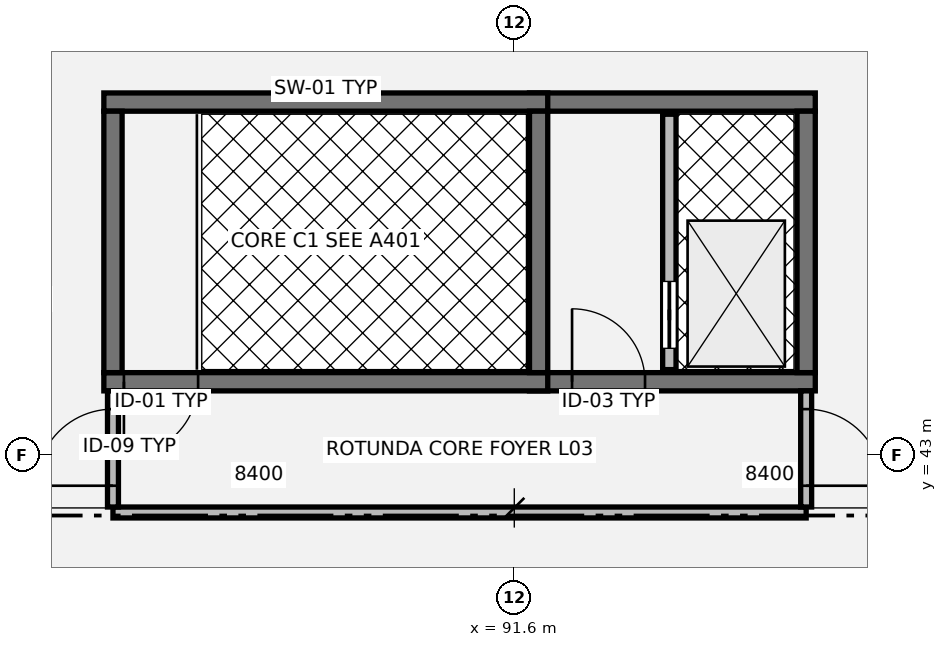
"""IFC4 building model, lengths in metres.
Left out: names, types, materials, properties, quantities, classifications, styles, units other than length and angle.
Written with IfcOpenShell. Run it as: python <this file> out.ifc"""

import sys

from ifc_helpers import new_model, si_unit, direction, frame, frame_2d, origin, place, context, subcontext, project, spatial, rectangle, circle, extrude, element, fill, save


model = new_model("IFC4")
c1 = context("Model", 3, precision=1e-05, world=origin(), true_north=direction((0.0, 1.0)))
c2 = subcontext(c1, "Body", "Model", "MODEL_VIEW")
j1 = project(units=[si_unit("LENGTHUNIT", "METRE"), si_unit("PLANEANGLEUNIT", "RADIAN")], contexts=[c1])
p1 = place(None, origin())
s1 = spatial("IfcSite", under=j1, at=p1, CompositionType="ELEMENT")
p2 = place(p1, origin())
s2 = spatial("IfcBuilding", under=s1, at=p2, CompositionType="ELEMENT")
p3 = place(p2, frame((0.0, 0.0, 13.26)))
s3 = spatial("IfcBuildingStorey", under=s2, at=p3, CompositionType="ELEMENT", Elevation=13.26)
p4 = place(p3, frame((85.271, 50.658, 0.0), z_axis=(0.0, 0.0, 1.0), x_axis=(-0.897210232885, -0.441603666205, 0.0)))
e1 = element("IfcWall", 1, at=p4, inside=s3, PredefinedType="SOLIDWALL", context=c2, shape_type="SweptSolid", body=[
    extrude(rectangle(XDim=2.145, YDim=0.295, at=frame_2d((1.072, 0.0))), origin(), (0.0, 0.0, 1.0), 3.855),
])
p5 = place(p4, frame((0.312, 0.0, 0.25)))
e2 = element("IfcOpeningElement", 2, at=p5, cuts=e1, PredefinedType="OPENING", context=c2, shape_type="SweptSolid", body=[
    extrude(circle(Radius=0.76, at=frame_2d((0.76, 0.76))), frame((0.0, 0.157, 0.0), z_axis=(0.0, -1.0, 0.0), x_axis=(1.0, 0.0, 0.0)), (0.0, 0.0, 1.0), 0.315),
])
p6 = place(p4, frame((0.312, 0.0, 2.03)))
e3 = element("IfcOpeningElement", 3, at=p6, cuts=e1, PredefinedType="OPENING", context=c2, shape_type="SweptSolid", body=[
    extrude(circle(Radius=0.76, at=frame_2d((0.76, 0.76))), frame((0.0, 0.157, 0.0), z_axis=(0.0, -1.0, 0.0), x_axis=(1.0, 0.0, 0.0)), (0.0, 0.0, 1.0), 0.315),
])
p7 = place(p3, frame((91.85, 44.2, 0.0), z_axis=(0.0, 0.0, 1.0), x_axis=(1.0, 0.0, 0.0)))
e4 = element("IfcWall", 4, at=p7, inside=s3, PredefinedType="SHEAR", context=c2, shape_type="SweptSolid", body=[
    extrude(rectangle(XDim=4.7, YDim=0.3, at=frame_2d((2.35, 0.0))), origin(), (0.0, 0.0, 1.0), 3.845),
])
p8 = place(p7, frame((0.7, 0.0, 0.0)))
e5 = element("IfcOpeningElement", 5, at=p8, cuts=e4, PredefinedType="OPENING", context=c2, shape_type="SweptSolid", body=[
    extrude(rectangle(XDim=1.2, YDim=2.16, at=frame_2d((0.6, 1.08))), frame((0.0, 0.16, 0.0), z_axis=(0.0, -1.0, 0.0), x_axis=(1.0, 0.0, 0.0)), (0.0, 0.0, 1.0), 0.32),
])
p9 = place(p3, frame((96.55, 48.8, 0.0), z_axis=(0.0, 0.0, 1.0), x_axis=(-1.0, 0.0, 0.0)))
e6 = element("IfcWall", 6, at=p9, inside=s3, PredefinedType="SHEAR", context=c2, shape_type="SweptSolid", body=[
    extrude(rectangle(XDim=4.7, YDim=0.3, at=frame_2d((2.35, 0.0))), origin(), (0.0, 0.0, 1.0), 3.845),
])
p10 = place(p3, frame((96.4, 44.35, 0.0), z_axis=(0.0, 0.0, 1.0), x_axis=(0.0, 1.0, 0.0)))
e7 = element("IfcWall", 7, at=p10, inside=s3, PredefinedType="SHEAR", context=c2, shape_type="SweptSolid", body=[
    extrude(rectangle(XDim=4.3, YDim=0.3, at=frame_2d((2.15, 0.0))), origin(), (0.0, 0.0, 1.0), 3.845),
])
p11 = place(p3, frame((94.15, 44.4, 0.0), z_axis=(0.0, 0.0, 1.0), x_axis=(0.0, 1.0, 0.0)))
e8 = element("IfcWall", 8, at=p11, inside=s3, PredefinedType="SOLIDWALL", context=c2, shape_type="SweptSolid", body=[
    extrude(rectangle(XDim=4.2, YDim=0.22, at=frame_2d((2.1, 0.0))), origin(), (0.0, 0.0, 1.0), 3.845),
])
p12 = place(p11, frame((0.35, 0.0, 0.0)))
e9 = element("IfcOpeningElement", 9, at=p12, cuts=e8, PredefinedType="OPENING", context=c2, shape_type="SweptSolid", body=[
    extrude(rectangle(XDim=1.1, YDim=2.15, at=frame_2d((0.55, 1.075))), frame((0.0, 0.12, 0.0), z_axis=(0.0, -1.0, 0.0), x_axis=(1.0, 0.0, 0.0)), (0.0, 0.0, 1.0), 0.24),
])
p13 = place(p3, frame((84.85, 44.2, 0.0), z_axis=(0.0, 0.0, 1.0), x_axis=(1.0, 0.0, 0.0)))
e10 = element("IfcWall", 10, at=p13, inside=s3, PredefinedType="SHEAR", context=c2, shape_type="SweptSolid", body=[
    extrude(rectangle(XDim=7.3, YDim=0.3, at=frame_2d((3.65, 0.0))), origin(), (0.0, 0.0, 1.0), 3.845),
])
p14 = place(p13, frame((0.33, 0.0, 0.0)))
e11 = element("IfcOpeningElement", 11, at=p14, cuts=e10, PredefinedType="OPENING", context=c2, shape_type="SweptSolid", body=[
    extrude(rectangle(XDim=1.22, YDim=2.18, at=frame_2d((0.61, 1.09))), frame((0.0, 0.16, 0.0), z_axis=(0.0, -1.0, 0.0), x_axis=(1.0, 0.0, 0.0)), (0.0, 0.0, 1.0), 0.32),
])
p15 = place(p3, frame((84.85, 48.8, 0.0), z_axis=(0.0, 0.0, 1.0), x_axis=(1.0, 0.0, 0.0)))
e12 = element("IfcWall", 12, at=p15, inside=s3, PredefinedType="SHEAR", context=c2, shape_type="SweptSolid", body=[
    extrude(rectangle(XDim=7.3, YDim=0.3, at=frame_2d((3.65, 0.0))), origin(), (0.0, 0.0, 1.0), 3.845),
])
for number, where, z_axis, x_axis in (
    (13, (85.0, 44.35, 0.0), (0.0, 0.0, 1.0), (0.0, 1.0, 0.0)),
    (14, (92.0, 44.35, 0.0), (0.0, 0.0, 1.0), (0.0, 1.0, 0.0)),
):
    element("IfcWall", number, at=place(p3, frame(where, z_axis=z_axis, x_axis=x_axis)), inside=s3, PredefinedType="SHEAR", context=c2, shape_type="SweptSolid", body=[
        extrude(rectangle(XDim=4.3, YDim=0.3, at=frame_2d((2.15, 0.0))), origin(), (0.0, 0.0, 1.0), 3.845),
    ])
p16 = place(p3, frame((85.0, 42.05, 0.0), z_axis=(0.0, 0.0, 1.0), x_axis=(1.0, 0.0, 0.0)))
e15 = element("IfcWall", 15, at=p16, inside=s3, PredefinedType="PARTITIONING", context=c2, shape_type="SweptSolid", body=[
    extrude(rectangle(XDim=11.4, YDim=0.18, at=frame_2d((5.7, 0.0))), origin(), (0.0, 0.0, 1.0), 3.23),
])
p17 = place(p3, frame((85.0, 42.14, 0.0), z_axis=(0.0, 0.0, 1.0), x_axis=(0.0, 1.0, 0.0)))
e16 = element("IfcWall", 16, at=p17, inside=s3, PredefinedType="PARTITIONING", context=c2, shape_type="SweptSolid", body=[
    extrude(rectangle(XDim=1.91, YDim=0.18, at=frame_2d((0.955, 0.0))), origin(), (0.0, 0.0, 1.0), 3.23),
])
p18 = place(p17, frame((0.35, 0.0, 0.0)))
e17 = element("IfcOpeningElement", 17, at=p18, cuts=e16, PredefinedType="OPENING", context=c2, shape_type="SweptSolid", body=[
    extrude(rectangle(XDim=1.26, YDim=2.2, at=frame_2d((0.63, 1.1))), frame((0.0, 0.1, 0.0), z_axis=(0.0, -1.0, 0.0), x_axis=(1.0, 0.0, 0.0)), (0.0, 0.0, 1.0), 0.2),
])
p19 = place(p3, frame((96.4, 42.14, 0.0), z_axis=(0.0, 0.0, 1.0), x_axis=(0.0, 1.0, 0.0)))
e18 = element("IfcWall", 18, at=p19, inside=s3, PredefinedType="PARTITIONING", context=c2, shape_type="SweptSolid", body=[
    extrude(rectangle(XDim=1.91, YDim=0.18, at=frame_2d((0.955, 0.0))), origin(), (0.0, 0.0, 1.0), 3.23),
])
p20 = place(p19, frame((0.35, 0.0, 0.0)))
e19 = element("IfcOpeningElement", 19, at=p20, cuts=e18, PredefinedType="OPENING", context=c2, shape_type="SweptSolid", body=[
    extrude(rectangle(XDim=1.26, YDim=2.2, at=frame_2d((0.63, 1.1))), frame((0.0, 0.1, 0.0), z_axis=(0.0, -1.0, 0.0), x_axis=(1.0, 0.0, 0.0)), (0.0, 0.0, 1.0), 0.2),
])
p21 = place(p8, origin())
e20 = element("IfcDoor", 20, at=p21, inside=s3, OperationType="SINGLE_SWING_LEFT", PredefinedType="DOOR", context=c2, shape_type="SweptSolid", body=[
    extrude(rectangle(XDim=1.2, YDim=2.16, at=frame_2d((0.6, 1.08))), frame((0.0, 0.025, 0.0), z_axis=(0.0, -1.0, 0.0), x_axis=(1.0, 0.0, 0.0)), (0.0, 0.0, 1.0), 0.05),
])
fill(e5, e20)
p22 = place(p12, origin())
e21 = element("IfcDoor", 21, at=p22, inside=s3, OperationType="SLIDING_TO_LEFT", PredefinedType="DOOR", context=c2, shape_type="SweptSolid", body=[
    extrude(rectangle(XDim=1.1, YDim=2.15, at=frame_2d((0.55, 1.075))), frame((0.0, 0.025, 0.0), z_axis=(0.0, -1.0, 0.0), x_axis=(1.0, 0.0, 0.0)), (0.0, 0.0, 1.0), 0.05),
])
fill(e9, e21)
p23 = place(p14, origin())
e22 = element("IfcDoor", 22, at=p23, inside=s3, OperationType="SINGLE_SWING_RIGHT", PredefinedType="DOOR", context=c2, shape_type="SweptSolid", body=[
    extrude(rectangle(XDim=1.22, YDim=2.18, at=frame_2d((0.61, 1.09))), frame((0.0, 0.025, 0.0), z_axis=(0.0, -1.0, 0.0), x_axis=(1.0, 0.0, 0.0)), (0.0, 0.0, 1.0), 0.05),
])
fill(e11, e22)
p24 = place(p18, origin())
e23 = element("IfcDoor", 23, at=p24, inside=s3, OperationType="SINGLE_SWING_LEFT", PredefinedType="DOOR", context=c2, shape_type="SweptSolid", body=[
    extrude(rectangle(XDim=1.26, YDim=2.2, at=frame_2d((0.63, 1.1))), frame((0.0, 0.025, 0.0), z_axis=(0.0, -1.0, 0.0), x_axis=(1.0, 0.0, 0.0)), (0.0, 0.0, 1.0), 0.05),
])
fill(e17, e23)
p25 = place(p20, origin())
e24 = element("IfcDoor", 24, at=p25, inside=s3, OperationType="SINGLE_SWING_RIGHT", PredefinedType="DOOR", context=c2, shape_type="SweptSolid", body=[
    extrude(rectangle(XDim=1.26, YDim=2.2, at=frame_2d((0.63, 1.1))), frame((0.0, 0.025, 0.0), z_axis=(0.0, -1.0, 0.0), x_axis=(1.0, 0.0, 0.0)), (0.0, 0.0, 1.0), 0.05),
])
fill(e19, e24)
save(model, sys.argv[1])
